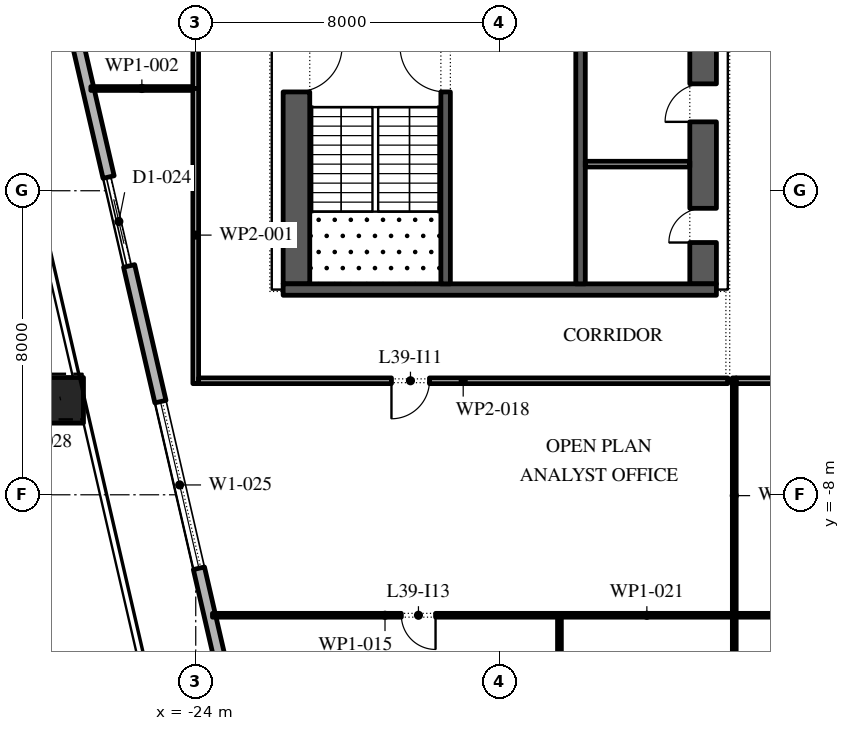
"""IFC4 building model, lengths in metres.
Left out: names, types, materials, properties, quantities, classifications, styles, units other than length and angle.
Written with IfcOpenShell. Run it as: python <this file> out.ifc"""

import sys

from ifc_helpers import new_model, si_unit, direction, frame, frame_2d, origin, origin_2d, place, context, subcontext, project, spatial, rectangle, extrude, element, fill, save


model = new_model("IFC4")
c1 = context("Model", 3, precision=1e-05, world=origin(), true_north=direction((0.0, 1.0)))
c2 = subcontext(c1, "Body", "Model", "MODEL_VIEW")
j1 = project(units=[si_unit("LENGTHUNIT", "METRE"), si_unit("PLANEANGLEUNIT", "RADIAN")], contexts=[c1])
p1 = place(None, origin())
s1 = spatial("IfcSite", under=j1, at=p1, CompositionType="ELEMENT")
p2 = place(p1, origin())
s2 = spatial("IfcBuilding", under=s1, at=p2, CompositionType="ELEMENT")
p3 = place(p2, frame((0.0, 0.0, 180.0)))
s3 = spatial("IfcBuildingStorey", under=s2, at=p3, CompositionType="ELEMENT", Elevation=180.0)
p4 = place(p3, frame((-27.554, -5.514, 0.0), z_axis=(-0.005404479485, 0.023361298418, 0.999712479335), x_axis=(-0.974268511785, -0.225390476607, 0.0)))
e1 = element("IfcColumn", 1, at=p4, inside=s3, PredefinedType="COLUMN", context=c2, shape_type="SweptSolid", body=[
    extrude(rectangle(XDim=1.2, YDim=1.2, at=origin_2d()), origin(), (0.0, 0.0, 1.0), 4.201),
])
p5 = place(p3, frame((-17.592, -20.657, 0.0), z_axis=(0.0, 0.0, 1.0), x_axis=(0.974370243697, 0.224950279389, 0.0)))
e2 = element("IfcWall", 2, at=p5, inside=s3, PredefinedType="STANDARD", context=c2, shape_type="SweptSolid", body=[
    extrude(rectangle(XDim=49.5, YDim=0.3, at=frame_2d((24.75, 0.0))), origin(), (0.0, 0.0, 1.0), 4.0),
])
p6 = place(p5, frame((3.6, 0.0, 0.0)))
e3 = element("IfcOpeningElement", 3, at=p6, cuts=e2, PredefinedType="OPENING", context=c2, shape_type="SweptSolid", body=[
    extrude(rectangle(XDim=2.4, YDim=3.5, at=frame_2d((1.2, 1.75))), frame((0.0, 0.16, 0.0), z_axis=(0.0, -1.0, 0.0), x_axis=(1.0, 0.0, 0.0)), (0.0, 0.0, 1.0), 0.32),
])
p7 = place(p5, frame((9.9, 0.0, 0.45)))
e4 = element("IfcOpeningElement", 4, at=p7, cuts=e2, PredefinedType="OPENING", context=c2, shape_type="SweptSolid", body=[
    extrude(rectangle(XDim=4.5, YDim=2.575, at=frame_2d((2.25, 1.288))), frame((0.0, 0.16, 0.0), z_axis=(0.0, -1.0, 0.0), x_axis=(1.0, 0.0, 0.0)), (0.0, 0.0, 1.0), 0.32),
])
p8 = place(p5, frame((18.2, 0.0, 0.45)))
e5 = element("IfcOpeningElement", 5, at=p8, cuts=e2, PredefinedType="OPENING", context=c2, shape_type="SweptSolid", body=[
    extrude(rectangle(XDim=4.5, YDim=3.05, at=frame_2d((2.25, 1.525))), frame((0.0, 0.16, 0.0), z_axis=(0.0, -1.0, 0.0), x_axis=(1.0, 0.0, 0.0)), (0.0, 0.0, 1.0), 0.32),
])
p9 = place(p5, frame((26.5, 0.0, 0.45)))
e6 = element("IfcOpeningElement", 6, at=p9, cuts=e2, PredefinedType="OPENING", context=c2, shape_type="SweptSolid", body=[
    extrude(rectangle(XDim=4.5, YDim=2.75, at=frame_2d((2.25, 1.375))), frame((0.0, 0.16, 0.0), z_axis=(0.0, -1.0, 0.0), x_axis=(1.0, 0.0, 0.0)), (0.0, 0.0, 1.0), 0.32),
])
p10 = place(p5, frame((36.8, 0.0, 0.0)))
e7 = element("IfcOpeningElement", 7, at=p10, cuts=e2, PredefinedType="OPENING", context=c2, shape_type="SweptSolid", body=[
    extrude(rectangle(XDim=2.4, YDim=3.275, at=frame_2d((1.2, 1.637))), frame((0.0, 0.16, 0.0), z_axis=(0.0, -1.0, 0.0), x_axis=(1.0, 0.0, 0.0)), (0.0, 0.0, 1.0), 0.32),
])
p11 = place(p5, frame((43.1, 0.0, 0.45)))
e8 = element("IfcOpeningElement", 8, at=p11, cuts=e2, PredefinedType="OPENING", context=c2, shape_type="SweptSolid", body=[
    extrude(rectangle(XDim=4.5, YDim=2.875, at=frame_2d((2.25, 1.438))), frame((0.0, 0.16, 0.0), z_axis=(0.0, -1.0, 0.0), x_axis=(1.0, 0.0, 0.0)), (0.0, 0.0, 1.0), 0.32),
])
p12 = place(p3, frame((-33.157, 30.092, 0.0), z_axis=(0.0, 0.0, 1.0), x_axis=(0.224950279389, -0.974370243697, 0.0)))
e9 = element("IfcWall", 9, at=p12, inside=s3, PredefinedType="STANDARD", context=c2, shape_type="SweptSolid", body=[
    extrude(rectangle(XDim=49.5, YDim=0.3, at=frame_2d((24.75, 0.0))), origin(), (0.0, 0.0, 1.0), 4.0),
])
p13 = place(p12, frame((2.207, 0.0, 0.0)))
e10 = element("IfcOpeningElement", 10, at=p13, cuts=e9, PredefinedType="OPENING", context=c2, shape_type="SweptSolid", body=[
    extrude(rectangle(XDim=2.4, YDim=3.5, at=frame_2d((1.2, 1.75))), frame((0.0, 0.16, 0.0), z_axis=(0.0, -1.0, 0.0), x_axis=(1.0, 0.0, 0.0)), (0.0, 0.0, 1.0), 0.32),
])
p14 = place(p12, frame((8.121, 0.0, 0.45)))
e11 = element("IfcOpeningElement", 11, at=p14, cuts=e9, PredefinedType="OPENING", context=c2, shape_type="SweptSolid", body=[
    extrude(rectangle(XDim=4.5, YDim=2.825, at=frame_2d((2.25, 1.413))), frame((0.0, 0.16, 0.0), z_axis=(0.0, -1.0, 0.0), x_axis=(1.0, 0.0, 0.0)), (0.0, 0.0, 1.0), 0.32),
])
p15 = place(p12, frame((15.236, 0.0, 0.45)))
e12 = element("IfcOpeningElement", 12, at=p15, cuts=e9, PredefinedType="OPENING", context=c2, shape_type="SweptSolid", body=[
    extrude(rectangle(XDim=4.5, YDim=2.95, at=frame_2d((2.25, 1.475))), frame((0.0, 0.16, 0.0), z_axis=(0.0, -1.0, 0.0), x_axis=(1.0, 0.0, 0.0)), (0.0, 0.0, 1.0), 0.32),
])
p16 = place(p12, frame((22.35, 0.0, 0.45)))
e13 = element("IfcOpeningElement", 13, at=p16, cuts=e9, PredefinedType="OPENING", context=c2, shape_type="SweptSolid", body=[
    extrude(rectangle(XDim=4.5, YDim=3.0, at=frame_2d((2.25, 1.5))), frame((0.0, 0.16, 0.0), z_axis=(0.0, -1.0, 0.0), x_axis=(1.0, 0.0, 0.0)), (0.0, 0.0, 1.0), 0.32),
])
p17 = place(p12, frame((30.514, 0.0, 0.0)))
e14 = element("IfcOpeningElement", 14, at=p17, cuts=e9, PredefinedType="OPENING", context=c2, shape_type="SweptSolid", body=[
    extrude(rectangle(XDim=2.4, YDim=3.5, at=frame_2d((1.2, 1.75))), frame((0.0, 0.16, 0.0), z_axis=(0.0, -1.0, 0.0), x_axis=(1.0, 0.0, 0.0)), (0.0, 0.0, 1.0), 0.32),
])
p18 = place(p12, frame((36.579, 0.0, 0.45)))
e15 = element("IfcOpeningElement", 15, at=p18, cuts=e9, PredefinedType="OPENING", context=c2, shape_type="SweptSolid", body=[
    extrude(rectangle(XDim=4.5, YDim=3.05, at=frame_2d((2.25, 1.525))), frame((0.0, 0.16, 0.0), z_axis=(0.0, -1.0, 0.0), x_axis=(1.0, 0.0, 0.0)), (0.0, 0.0, 1.0), 0.32),
])
p19 = place(p12, frame((43.693, 0.0, 0.45)))
e16 = element("IfcOpeningElement", 16, at=p19, cuts=e9, PredefinedType="OPENING", context=c2, shape_type="SweptSolid", body=[
    extrude(rectangle(XDim=4.5, YDim=3.05, at=frame_2d((2.25, 1.525))), frame((0.0, 0.16, 0.0), z_axis=(0.0, -1.0, 0.0), x_axis=(1.0, 0.0, 0.0)), (0.0, 0.0, 1.0), 0.32),
])
p20 = place(p3, frame((-21.35, -2.45, 0.0), z_axis=(0.0, 0.0, 1.0), x_axis=(0.0, 1.0, 0.0)))
e17 = element("IfcWall", 17, at=p20, inside=s3, PredefinedType="SHEAR", context=c2, shape_type="SweptSolid", body=[
    extrude(rectangle(XDim=27.9, YDim=0.7, at=frame_2d((13.95, 0.0))), origin(), (0.0, 0.0, 1.0), 4.0),
])
p21 = place(p20, frame((5.05, 0.0, 0.0)))
e18 = element("IfcOpeningElement", 18, at=p21, cuts=e17, PredefinedType="OPENING", context=c2, shape_type="SweptSolid", body=[
    extrude(rectangle(XDim=1.2, YDim=2.1, at=frame_2d((0.6, 1.05))), frame((0.0, 0.36, 0.0), z_axis=(0.0, -1.0, 0.0), x_axis=(1.0, 0.0, 0.0)), (0.0, 0.0, 1.0), 0.72),
])
p22 = place(p20, frame((21.65, 0.0, 0.0)))
e19 = element("IfcOpeningElement", 19, at=p22, cuts=e17, PredefinedType="OPENING", context=c2, shape_type="SweptSolid", body=[
    extrude(rectangle(XDim=1.2, YDim=2.1, at=frame_2d((0.6, 1.05))), frame((0.0, 0.36, 0.0), z_axis=(0.0, -1.0, 0.0), x_axis=(1.0, 0.0, 0.0)), (0.0, 0.0, 1.0), 0.72),
])
p23 = place(p3, frame((-10.65, -2.45, 0.0), z_axis=(0.0, 0.0, 1.0), x_axis=(0.0, 1.0, 0.0)))
e20 = element("IfcWall", 20, at=p23, inside=s3, PredefinedType="SHEAR", context=c2, shape_type="SweptSolid", body=[
    extrude(rectangle(XDim=27.9, YDim=0.7, at=frame_2d((13.95, 0.0))), origin(), (0.0, 0.0, 1.0), 4.0),
])
p24 = place(p23, frame((23.65, 0.0, 0.0)))
e21 = element("IfcOpeningElement", 21, at=p24, cuts=e20, PredefinedType="OPENING", context=c2, shape_type="SweptSolid", body=[
    extrude(rectangle(XDim=2.4, YDim=2.1, at=frame_2d((1.2, 1.05))), frame((0.0, 0.36, 0.0), z_axis=(0.0, -1.0, 0.0), x_axis=(1.0, 0.0, 0.0)), (0.0, 0.0, 1.0), 0.72),
])
p25 = place(p23, frame((1.087, 0.0, 0.0)))
e22 = element("IfcOpeningElement", 22, at=p25, cuts=e20, PredefinedType="OPENING", context=c2, shape_type="SweptSolid", body=[
    extrude(rectangle(XDim=0.9, YDim=2.1, at=frame_2d((0.45, 1.05))), frame((0.0, 0.36, 0.0), z_axis=(0.0, -1.0, 0.0), x_axis=(1.0, 0.0, 0.0)), (0.0, 0.0, 1.0), 0.72),
])
p26 = place(p23, frame((4.262, 0.0, 0.0)))
e23 = element("IfcOpeningElement", 23, at=p26, cuts=e20, PredefinedType="OPENING", context=c2, shape_type="SweptSolid", body=[
    extrude(rectangle(XDim=1.0, YDim=2.1, at=frame_2d((0.5, 1.05))), frame((0.0, 0.36, 0.0), z_axis=(0.0, -1.0, 0.0), x_axis=(1.0, 0.0, 0.0)), (0.0, 0.0, 1.0), 0.72),
])
p27 = place(p3, frame((-21.7, -2.6, 0.0), z_axis=(0.0, 0.0, 1.0), x_axis=(1.0, 0.0, 0.0)))
e24 = element("IfcWall", 24, at=p27, inside=s3, PredefinedType="SHEAR", context=c2, shape_type="SweptSolid", body=[
    extrude(rectangle(XDim=11.4, YDim=0.3, at=frame_2d((5.7, 0.0))), origin(), (0.0, 0.0, 1.0), 4.0),
])
p28 = place(p3, frame((-17.425, -2.45, 0.0), z_axis=(0.0, 0.0, 1.0), x_axis=(0.0, 1.0, 0.0)))
e25 = element("IfcWall", 25, at=p28, inside=s3, PredefinedType="SHEAR", context=c2, shape_type="SweptSolid", body=[
    extrude(rectangle(XDim=6.3, YDim=0.25, at=frame_2d((3.15, 0.0))), origin(), (0.0, 0.0, 1.0), 4.0),
])
p29 = place(p28, frame((5.05, 0.0, 0.0)))
e26 = element("IfcOpeningElement", 26, at=p29, cuts=e25, PredefinedType="OPENING", context=c2, shape_type="SweptSolid", body=[
    extrude(rectangle(XDim=1.2, YDim=2.1, at=frame_2d((0.6, 1.05))), frame((0.0, 0.135, 0.0), z_axis=(0.0, -1.0, 0.0), x_axis=(1.0, 0.0, 0.0)), (0.0, 0.0, 1.0), 0.27),
])
p30 = place(p3, frame((-13.875, -2.45, 0.0), z_axis=(0.0, 0.0, 1.0), x_axis=(0.0, 1.0, 0.0)))
e27 = element("IfcWall", 27, at=p30, inside=s3, PredefinedType="SHEAR", context=c2, shape_type="SweptSolid", body=[
    extrude(rectangle(XDim=21.3, YDim=0.25, at=frame_2d((10.65, 0.0))), origin(), (0.0, 0.0, 1.0), 4.0),
])
p31 = place(p30, frame((17.786, 0.0, 0.0)))
e28 = element("IfcOpeningElement", 28, at=p31, cuts=e27, PredefinedType="OPENING", context=c2, shape_type="SweptSolid", body=[
    extrude(rectangle(XDim=0.9, YDim=2.1, at=frame_2d((0.45, 1.05))), frame((0.0, 0.135, 0.0), z_axis=(0.0, -1.0, 0.0), x_axis=(1.0, 0.0, 0.0)), (0.0, 0.0, 1.0), 0.27),
])
p32 = place(p30, frame((6.971, 0.0, 0.0)))
e29 = element("IfcOpeningElement", 29, at=p32, cuts=e27, PredefinedType="OPENING", context=c2, shape_type="SweptSolid", body=[
    extrude(rectangle(XDim=1.1, YDim=2.1, at=frame_2d((0.55, 1.05))), frame((0.0, 0.135, 0.0), z_axis=(0.0, -1.0, 0.0), x_axis=(1.0, 0.0, 0.0)), (0.0, 0.0, 1.0), 0.27),
])
p33 = place(p30, frame((9.114, 0.0, 0.0)))
e30 = element("IfcOpeningElement", 30, at=p33, cuts=e27, PredefinedType="OPENING", context=c2, shape_type="SweptSolid", body=[
    extrude(rectangle(XDim=1.1, YDim=2.1, at=frame_2d((0.55, 1.05))), frame((0.0, 0.135, 0.0), z_axis=(0.0, -1.0, 0.0), x_axis=(1.0, 0.0, 0.0)), (0.0, 0.0, 1.0), 0.27),
])
p34 = place(p30, frame((11.257, 0.0, 0.0)))
e31 = element("IfcOpeningElement", 31, at=p34, cuts=e27, PredefinedType="OPENING", context=c2, shape_type="SweptSolid", body=[
    extrude(rectangle(XDim=1.1, YDim=2.1, at=frame_2d((0.55, 1.05))), frame((0.0, 0.135, 0.0), z_axis=(0.0, -1.0, 0.0), x_axis=(1.0, 0.0, 0.0)), (0.0, 0.0, 1.0), 0.27),
])
p35 = place(p30, frame((13.4, 0.0, 0.0)))
e32 = element("IfcOpeningElement", 32, at=p35, cuts=e27, PredefinedType="OPENING", context=c2, shape_type="SweptSolid", body=[
    extrude(rectangle(XDim=1.1, YDim=2.1, at=frame_2d((0.55, 1.05))), frame((0.0, 0.135, 0.0), z_axis=(0.0, -1.0, 0.0), x_axis=(1.0, 0.0, 0.0)), (0.0, 0.0, 1.0), 0.27),
])
p36 = place(p3, frame((-13.75, 0.7, 0.0), z_axis=(0.0, 0.0, 1.0), x_axis=(1.0, 0.0, 0.0)))
e33 = element("IfcWall", 33, at=p36, inside=s3, PredefinedType="PARTITIONING", context=c2, shape_type="SweptSolid", body=[
    extrude(rectangle(XDim=2.75, YDim=0.15, at=frame_2d((1.375, 0.0))), origin(), (0.0, 0.0, 1.0), 4.0),
])
p37 = place(p3, frame((-24.0, -5.075, 0.0), z_axis=(0.0, 0.0, 1.0), x_axis=(0.0, 1.0, 0.0)))
e34 = element("IfcWall", 34, at=p37, inside=s3, PredefinedType="PARTITIONING", context=c2, shape_type="SweptSolid", body=[
    extrude(rectangle(XDim=7.815, YDim=0.15, at=frame_2d((3.907, 0.0))), origin(), (0.0, 0.0, 1.0), 4.0),
])
p38 = place(p3, frame((-24.075, 2.69, 0.0), z_axis=(0.0, 0.0, 1.0), x_axis=(-1.0, 0.0, 0.0)))
e35 = element("IfcWall", 35, at=p38, inside=s3, PredefinedType="PARTITIONING", context=c2, shape_type="SweptSolid", body=[
    extrude(rectangle(XDim=2.685, YDim=0.1, at=frame_2d((1.343, 0.0))), origin(), (0.0, 0.0, 1.0), 4.0),
])
p39 = place(p3, frame((-24.0, 2.69, 0.0), z_axis=(0.0, 0.0, 1.0), x_axis=(0.0, 1.0, 0.0)))
e36 = element("IfcWall", 36, at=p39, inside=s3, PredefinedType="PARTITIONING", context=c2, shape_type="SweptSolid", body=[
    extrude(rectangle(XDim=12.74, YDim=0.15, at=frame_2d((6.37, 0.0))), origin(), (0.0, 0.0, 1.0), 4.0),
])
p40 = place(p39, frame((5.79, 0.0, 0.0)))
e37 = element("IfcOpeningElement", 37, at=p40, cuts=e36, PredefinedType="OPENING", context=c2, shape_type="SweptSolid", body=[
    extrude(rectangle(XDim=1.0, YDim=2.1, at=frame_2d((0.5, 1.05))), frame((0.0, 0.085, 0.0), z_axis=(0.0, -1.0, 0.0), x_axis=(1.0, 0.0, 0.0)), (0.0, 0.0, 1.0), 0.17),
])
p41 = place(p3, frame((-14.43, -19.856, 0.0), z_axis=(0.0, 0.0, 1.0), x_axis=(0.0, 1.0, 0.0)))
e38 = element("IfcWall", 38, at=p41, inside=s3, PredefinedType="PARTITIONING", context=c2, shape_type="SweptSolid", body=[
    extrude(rectangle(XDim=8.736, YDim=0.1, at=frame_2d((4.368, 0.0))), origin(), (0.0, 0.0, 1.0), 4.0),
])
p42 = place(p3, frame((-14.48, -11.17, 0.0), z_axis=(0.0, 0.0, 1.0), x_axis=(-1.0, 0.0, 0.0)))
e39 = element("IfcWall", 39, at=p42, inside=s3, PredefinedType="PARTITIONING", context=c2, shape_type="SweptSolid", body=[
    extrude(rectangle(XDim=9.08, YDim=0.1, at=frame_2d((4.54, 0.0))), origin(), (0.0, 0.0, 1.0), 4.0),
])
p43 = place(p42, frame((3.21, 0.0, 0.0)))
e40 = element("IfcOpeningElement", 40, at=p43, cuts=e39, PredefinedType="OPENING", context=c2, shape_type="SweptSolid", body=[
    extrude(rectangle(XDim=0.9, YDim=2.1, at=frame_2d((0.45, 1.05))), frame((0.0, 0.06, 0.0), z_axis=(0.0, -1.0, 0.0), x_axis=(1.0, 0.0, 0.0)), (0.0, 0.0, 1.0), 0.12),
])
p44 = place(p3, frame((-10.0, -5.0, 0.0), z_axis=(0.0, 0.0, 1.0), x_axis=(-1.0, 0.0, 0.0)))
e41 = element("IfcWall", 41, at=p44, inside=s3, PredefinedType="PARTITIONING", context=c2, shape_type="SweptSolid", body=[
    extrude(rectangle(XDim=13.925, YDim=0.15, at=frame_2d((6.962, 0.0))), origin(), (0.0, 0.0, 1.0), 4.0),
])
p45 = place(p44, frame((7.85, 0.0, 0.0)))
e42 = element("IfcOpeningElement", 42, at=p45, cuts=e41, PredefinedType="OPENING", context=c2, shape_type="SweptSolid", body=[
    extrude(rectangle(XDim=1.0, YDim=2.1, at=frame_2d((0.5, 1.05))), frame((0.0, 0.085, 0.0), z_axis=(0.0, -1.0, 0.0), x_axis=(1.0, 0.0, 0.0)), (0.0, 0.0, 1.0), 0.17),
])
p46 = place(p3, frame((-9.83, -18.794, 0.0), z_axis=(0.0, 0.0, 1.0), x_axis=(0.0, 1.0, 0.0)))
e43 = element("IfcWall", 43, at=p46, inside=s3, PredefinedType="PARTITIONING", context=c2, shape_type="SweptSolid", body=[
    extrude(rectangle(XDim=7.674, YDim=0.1, at=frame_2d((3.837, 0.0))), origin(), (0.0, 0.0, 1.0), 4.0),
])
p47 = place(p46, frame((3.274, 0.0, 0.0)))
e44 = element("IfcOpeningElement", 44, at=p47, cuts=e43, PredefinedType="OPENING", context=c2, shape_type="SweptSolid", body=[
    extrude(rectangle(XDim=0.9, YDim=2.1, at=frame_2d((0.45, 1.05))), frame((0.0, 0.06, 0.0), z_axis=(0.0, -1.0, 0.0), x_axis=(1.0, 0.0, 0.0)), (0.0, 0.0, 1.0), 0.12),
])
p48 = place(p3, frame((-9.88, -11.17, 0.0), z_axis=(0.0, 0.0, 1.0), x_axis=(-1.0, 0.0, 0.0)))
e45 = element("IfcWall", 45, at=p48, inside=s3, PredefinedType="PARTITIONING", context=c2, shape_type="SweptSolid", body=[
    extrude(rectangle(XDim=4.5, YDim=0.1, at=frame_2d((2.25, 0.0))), origin(), (0.0, 0.0, 1.0), 4.0),
])
p49 = place(p3, frame((-9.83, -11.12, 0.0), z_axis=(0.0, 0.0, 1.0), x_axis=(0.0, 1.0, 0.0)))
e46 = element("IfcWall", 46, at=p49, inside=s3, PredefinedType="PARTITIONING", context=c2, shape_type="SweptSolid", body=[
    extrude(rectangle(XDim=6.195, YDim=0.1, at=frame_2d((3.098, 0.0))), origin(), (0.0, 0.0, 1.0), 4.0),
])
p50 = place(p3, frame((-9.78, -11.17, 0.0), z_axis=(0.0, 0.0, 1.0), x_axis=(1.0, 0.0, 0.0)))
e47 = element("IfcWall", 47, at=p50, inside=s3, PredefinedType="PARTITIONING", context=c2, shape_type="SweptSolid", body=[
    extrude(rectangle(XDim=8.755, YDim=0.1, at=frame_2d((4.377, 0.0))), origin(), (0.0, 0.0, 1.0), 4.0),
])
p51 = place(p3, frame((-1.175, -5.0, 0.0), z_axis=(0.0, 0.0, 1.0), x_axis=(-1.0, 0.0, 0.0)))
e48 = element("IfcWall", 48, at=p51, inside=s3, PredefinedType="PARTITIONING", context=c2, shape_type="SweptSolid", body=[
    extrude(rectangle(XDim=8.605, YDim=0.15, at=frame_2d((4.302, 0.0))), origin(), (0.0, 0.0, 1.0), 4.0),
])
p52 = place(p51, frame((2.005, 0.0, 0.0)))
e49 = element("IfcOpeningElement", 49, at=p52, cuts=e48, PredefinedType="OPENING", context=c2, shape_type="SweptSolid", body=[
    extrude(rectangle(XDim=1.0, YDim=2.1, at=frame_2d((0.5, 1.05))), frame((0.0, 0.085, 0.0), z_axis=(0.0, -1.0, 0.0), x_axis=(1.0, 0.0, 0.0)), (0.0, 0.0, 1.0), 0.17),
])
p53 = place(p17, origin())
e50 = element("IfcDoor", 50, at=p53, inside=s3, OperationType="DOUBLE_DOOR_SLIDING", PredefinedType="DOOR", context=c2, shape_type="SweptSolid", body=[
    extrude(rectangle(XDim=2.4, YDim=3.5, at=frame_2d((1.2, 1.75))), frame((0.0, 0.025, 0.0), z_axis=(0.0, -1.0, 0.0), x_axis=(1.0, 0.0, 0.0)), (0.0, 0.0, 1.0), 0.05),
])
fill(e14, e50)
p54 = place(p18, origin())
e51 = element("IfcWindow", 51, at=p54, inside=s3, PartitioningType="DOUBLE_PANEL_VERTICAL", PredefinedType="WINDOW", context=c2, shape_type="SweptSolid", body=[
    extrude(rectangle(XDim=4.5, YDim=3.05, at=frame_2d((2.25, 1.525))), frame((0.0, 0.03, 0.0), z_axis=(0.0, -1.0, 0.0), x_axis=(1.0, 0.0, 0.0)), (0.0, 0.0, 1.0), 0.06),
])
fill(e15, e51)
p55 = place(p29, origin())
e52 = element("IfcDoor", 52, at=p55, inside=s3, OperationType="SINGLE_SWING_LEFT", PredefinedType="DOOR", context=c2, shape_type="SweptSolid", body=[
    extrude(rectangle(XDim=1.2, YDim=2.1, at=frame_2d((0.6, 1.05))), frame((0.0, 0.025, 0.0), z_axis=(0.0, -1.0, 0.0), x_axis=(1.0, 0.0, 0.0)), (0.0, 0.0, 1.0), 0.05),
])
fill(e26, e52)
p56 = place(p21, frame((1.2, 0.0, 0.0), z_axis=(0.0, 0.0, 1.0), x_axis=(-1.0, 0.0, 0.0)))
e53 = element("IfcDoor", 53, at=p56, inside=s3, OperationType="SINGLE_SWING_RIGHT", PredefinedType="DOOR", context=c2, shape_type="SweptSolid", body=[
    extrude(rectangle(XDim=1.2, YDim=2.1, at=frame_2d((0.6, 1.05))), frame((0.0, 0.025, 0.0), z_axis=(0.0, -1.0, 0.0), x_axis=(1.0, 0.0, 0.0)), (0.0, 0.0, 1.0), 0.05),
])
fill(e18, e53)
p57 = place(p25, origin())
e54 = element("IfcDoor", 54, at=p57, inside=s3, OperationType="SINGLE_SWING_RIGHT", PredefinedType="DOOR", context=c2, shape_type="SweptSolid", body=[
    extrude(rectangle(XDim=0.9, YDim=2.1, at=frame_2d((0.45, 1.05))), frame((0.0, 0.35, 0.0), z_axis=(0.0, -1.0, 0.0), x_axis=(1.0, 0.0, 0.0)), (0.0, 0.0, 1.0), 0.05),
])
fill(e22, e54)
p58 = place(p26, origin())
e55 = element("IfcDoor", 55, at=p58, inside=s3, OperationType="SINGLE_SWING_RIGHT", PredefinedType="DOOR", context=c2, shape_type="SweptSolid", body=[
    extrude(rectangle(XDim=1.0, YDim=2.1, at=frame_2d((0.5, 1.05))), frame((0.0, 0.35, 0.0), z_axis=(0.0, -1.0, 0.0), x_axis=(1.0, 0.0, 0.0)), (0.0, 0.0, 1.0), 0.05),
])
fill(e23, e55)
p59 = place(p45, origin())
e56 = element("IfcDoor", 56, at=p59, inside=s3, OperationType="SINGLE_SWING_LEFT", PredefinedType="DOOR", context=c2, shape_type="SweptSolid", body=[
    extrude(rectangle(XDim=1.0, YDim=2.1, at=frame_2d((0.5, 1.05))), frame((0.0, 0.025, 0.0), z_axis=(0.0, -1.0, 0.0), x_axis=(1.0, 0.0, 0.0)), (0.0, 0.0, 1.0), 0.05),
])
fill(e42, e56)
p60 = place(p43, origin())
e57 = element("IfcDoor", 57, at=p60, inside=s3, OperationType="SINGLE_SWING_RIGHT", PredefinedType="DOOR", context=c2, shape_type="SweptSolid", body=[
    extrude(rectangle(XDim=0.9, YDim=2.1, at=frame_2d((0.45, 1.05))), frame((0.0, 0.025, 0.0), z_axis=(0.0, -1.0, 0.0), x_axis=(1.0, 0.0, 0.0)), (0.0, 0.0, 1.0), 0.05),
])
fill(e40, e57)
save(model, sys.argv[1])
